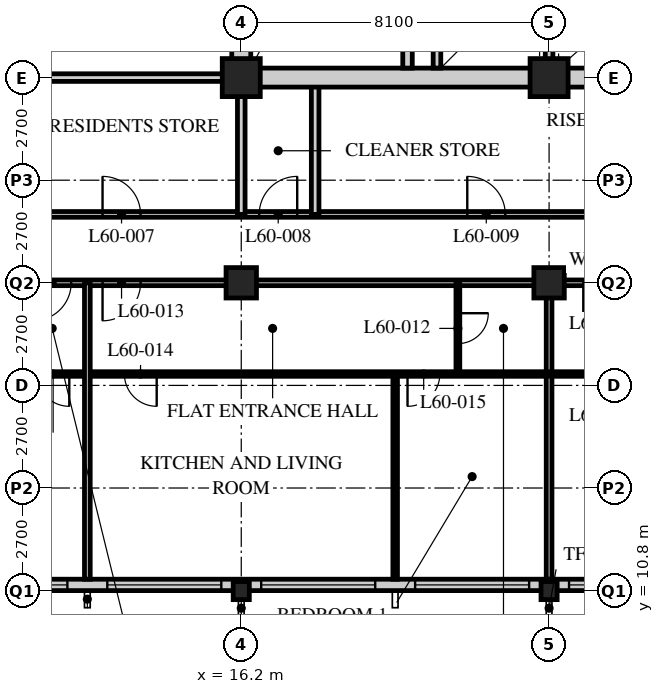
"""IFC4 building model, lengths in metres.
Left out: names, types, materials, properties, quantities, classifications, styles, units other than length and angle.
Written with IfcOpenShell. Run it as: python <this file> out.ifc"""

import sys

from ifc_helpers import new_model, si_unit, direction, frame, frame_2d, origin, origin_2d, place, context, subcontext, project, spatial, rectangle, hollow_rectangle, i_section, extrude, element, fill, save


model = new_model("IFC4")
c1 = context("Model", 3, precision=1e-05, world=origin(), true_north=direction((0.0, 1.0)))
c2 = subcontext(c1, "Body", "Model", "MODEL_VIEW")
j1 = project(units=[si_unit("LENGTHUNIT", "METRE"), si_unit("PLANEANGLEUNIT", "RADIAN")], contexts=[c1])
p1 = place(None, origin())
s1 = spatial("IfcSite", under=j1, at=p1, CompositionType="ELEMENT")
p2 = place(p1, origin())
s2 = spatial("IfcBuilding", under=s1, at=p2, CompositionType="ELEMENT")
p3 = place(p2, frame((0.0, 0.0, 231.6)))
s3 = spatial("IfcBuildingStorey", under=s2, at=p3, CompositionType="ELEMENT", Elevation=231.6)
p4 = place(p3, frame((16.2, 10.8, 0.0), z_axis=(0.0, 0.0, 1.0), x_axis=(1.0, 0.0, 0.0)))
e1 = element("IfcColumn", 1, at=p4, inside=s3, PredefinedType="COLUMN", context=c2, shape_type="SweptSolid", body=[
    extrude(i_section(OverallWidth=0.424, OverallDepth=0.475, WebThickness=0.048, FlangeThickness=0.077, FilletRadius=0.015, at=origin_2d()), origin(), (0.0, 0.0, 1.0), 3.6),
])
p5 = place(p3, frame((16.2, 18.9, 0.0), z_axis=(0.0, 0.0, 1.0), x_axis=(1.0, 0.0, 0.0)))
e2 = element("IfcColumn", 2, at=p5, inside=s3, PredefinedType="COLUMN", context=c2, shape_type="SweptSolid", body=[
    extrude(hollow_rectangle(XDim=0.8, YDim=0.8, WallThickness=0.08, at=origin_2d()), origin(), (0.0, 0.0, 1.0), 3.6),
])
p6 = place(p3, frame((16.2, 24.3, 0.0), z_axis=(0.0, 0.0, 1.0), x_axis=(1.0, 0.0, 0.0)))
e3 = element("IfcColumn", 3, at=p6, inside=s3, PredefinedType="COLUMN", context=c2, shape_type="SweptSolid", body=[
    extrude(hollow_rectangle(XDim=1.0, YDim=1.0, WallThickness=0.1, at=origin_2d()), origin(), (0.0, 0.0, 1.0), 3.6),
])
p7 = place(p3, frame((24.3, 10.8, 0.0), z_axis=(0.0, 0.0, 1.0), x_axis=(1.0, 0.0, 0.0)))
e4 = element("IfcColumn", 4, at=p7, inside=s3, PredefinedType="COLUMN", context=c2, shape_type="SweptSolid", body=[
    extrude(i_section(OverallWidth=0.424, OverallDepth=0.475, WebThickness=0.048, FlangeThickness=0.077, FilletRadius=0.015, at=origin_2d()), origin(), (0.0, 0.0, 1.0), 3.6),
])
p8 = place(p3, frame((24.3, 18.9, 0.0), z_axis=(0.0, 0.0, 1.0), x_axis=(1.0, 0.0, 0.0)))
e5 = element("IfcColumn", 5, at=p8, inside=s3, PredefinedType="COLUMN", context=c2, shape_type="SweptSolid", body=[
    extrude(hollow_rectangle(XDim=0.8, YDim=0.8, WallThickness=0.08, at=origin_2d()), origin(), (0.0, 0.0, 1.0), 3.6),
])
p9 = place(p3, frame((24.3, 24.3, 0.0), z_axis=(0.0, 0.0, 1.0), x_axis=(1.0, 0.0, 0.0)))
e6 = element("IfcColumn", 6, at=p9, inside=s3, PredefinedType="COLUMN", context=c2, shape_type="SweptSolid", body=[
    extrude(hollow_rectangle(XDim=1.0, YDim=1.0, WallThickness=0.1, at=origin_2d()), origin(), (0.0, 0.0, 1.0), 3.6),
])
p10 = place(p3, frame((8.4, 10.95, 0.0), z_axis=(0.0, 0.0, 1.0), x_axis=(1.0, 0.0, 0.0)))
e7 = element("IfcWall", 7, at=p10, inside=s3, PredefinedType="SOLIDWALL", context=c2, shape_type="SweptSolid", body=[
    extrude(rectangle(XDim=40.2, YDim=0.3, at=frame_2d((20.1, 0.0))), origin(), (0.0, 0.0, 1.0), 2.35),
])
p11 = place(p10, frame((0.225, 0.0, 0.6)))
e8 = element("IfcOpeningElement", 8, at=p11, cuts=e7, PredefinedType="OPENING", context=c2, shape_type="SweptSolid", body=[
    extrude(rectangle(XDim=3.0, YDim=1.7, at=frame_2d((1.5, 0.85))), frame((0.0, 0.16, 0.0), z_axis=(0.0, -1.0, 0.0), x_axis=(1.0, 0.0, 0.0)), (0.0, 0.0, 1.0), 0.32),
])
p12 = place(p10, frame((4.275, 0.0, 0.6)))
e9 = element("IfcOpeningElement", 9, at=p12, cuts=e7, PredefinedType="OPENING", context=c2, shape_type="SweptSolid", body=[
    extrude(rectangle(XDim=3.0, YDim=1.7, at=frame_2d((1.5, 0.85))), frame((0.0, 0.16, 0.0), z_axis=(0.0, -1.0, 0.0), x_axis=(1.0, 0.0, 0.0)), (0.0, 0.0, 1.0), 0.32),
])
p13 = place(p10, frame((8.325, 0.0, 0.6)))
e10 = element("IfcOpeningElement", 10, at=p13, cuts=e7, PredefinedType="OPENING", context=c2, shape_type="SweptSolid", body=[
    extrude(rectangle(XDim=3.0, YDim=1.7, at=frame_2d((1.5, 0.85))), frame((0.0, 0.16, 0.0), z_axis=(0.0, -1.0, 0.0), x_axis=(1.0, 0.0, 0.0)), (0.0, 0.0, 1.0), 0.32),
])
p14 = place(p10, frame((12.375, 0.0, 0.6)))
e11 = element("IfcOpeningElement", 11, at=p14, cuts=e7, PredefinedType="OPENING", context=c2, shape_type="SweptSolid", body=[
    extrude(rectangle(XDim=3.0, YDim=1.7, at=frame_2d((1.5, 0.85))), frame((0.0, 0.16, 0.0), z_axis=(0.0, -1.0, 0.0), x_axis=(1.0, 0.0, 0.0)), (0.0, 0.0, 1.0), 0.32),
])
p15 = place(p10, frame((16.425, 0.0, 0.6)))
e12 = element("IfcOpeningElement", 12, at=p15, cuts=e7, PredefinedType="OPENING", context=c2, shape_type="SweptSolid", body=[
    extrude(rectangle(XDim=3.0, YDim=1.7, at=frame_2d((1.5, 0.85))), frame((0.0, 0.16, 0.0), z_axis=(0.0, -1.0, 0.0), x_axis=(1.0, 0.0, 0.0)), (0.0, 0.0, 1.0), 0.32),
])
p16 = place(p10, frame((20.475, 0.0, 0.6)))
e13 = element("IfcOpeningElement", 13, at=p16, cuts=e7, PredefinedType="OPENING", context=c2, shape_type="SweptSolid", body=[
    extrude(rectangle(XDim=3.0, YDim=1.7, at=frame_2d((1.5, 0.85))), frame((0.0, 0.16, 0.0), z_axis=(0.0, -1.0, 0.0), x_axis=(1.0, 0.0, 0.0)), (0.0, 0.0, 1.0), 0.32),
])
p17 = place(p10, frame((24.525, 0.0, 0.6)))
e14 = element("IfcOpeningElement", 14, at=p17, cuts=e7, PredefinedType="OPENING", context=c2, shape_type="SweptSolid", body=[
    extrude(rectangle(XDim=3.0, YDim=1.7, at=frame_2d((1.5, 0.85))), frame((0.0, 0.16, 0.0), z_axis=(0.0, -1.0, 0.0), x_axis=(1.0, 0.0, 0.0)), (0.0, 0.0, 1.0), 0.32),
])
p18 = place(p10, frame((28.575, 0.0, 0.6)))
e15 = element("IfcOpeningElement", 15, at=p18, cuts=e7, PredefinedType="OPENING", context=c2, shape_type="SweptSolid", body=[
    extrude(rectangle(XDim=3.0, YDim=1.7, at=frame_2d((1.5, 0.85))), frame((0.0, 0.16, 0.0), z_axis=(0.0, -1.0, 0.0), x_axis=(1.0, 0.0, 0.0)), (0.0, 0.0, 1.0), 0.32),
])
p19 = place(p10, frame((32.625, 0.0, 0.6)))
e16 = element("IfcOpeningElement", 16, at=p19, cuts=e7, PredefinedType="OPENING", context=c2, shape_type="SweptSolid", body=[
    extrude(rectangle(XDim=3.0, YDim=1.7, at=frame_2d((1.5, 0.85))), frame((0.0, 0.16, 0.0), z_axis=(0.0, -1.0, 0.0), x_axis=(1.0, 0.0, 0.0)), (0.0, 0.0, 1.0), 0.32),
])
p20 = place(p10, frame((36.675, 0.0, 0.6)))
e17 = element("IfcOpeningElement", 17, at=p20, cuts=e7, PredefinedType="OPENING", context=c2, shape_type="SweptSolid", body=[
    extrude(rectangle(XDim=3.0, YDim=1.7, at=frame_2d((1.5, 0.85))), frame((0.0, 0.16, 0.0), z_axis=(0.0, -1.0, 0.0), x_axis=(1.0, 0.0, 0.0)), (0.0, 0.0, 1.0), 0.32),
])
p21 = place(p3, frame((8.1, 18.9, 0.0), z_axis=(0.0, 0.0, 1.0), x_axis=(1.0, 0.0, 0.0)))
e18 = element("IfcWall", 18, at=p21, inside=s3, PredefinedType="PARTITIONING", context=c2, shape_type="SweptSolid", body=[
    extrude(rectangle(XDim=36.45, YDim=0.15, at=frame_2d((18.225, 0.0))), origin(), (0.0, 0.0, 1.0), 2.35),
])
p22 = place(p21, frame((4.45, 0.0, 0.0)))
e19 = element("IfcOpeningElement", 19, at=p22, cuts=e18, PredefinedType="OPENING", context=c2, shape_type="SweptSolid", body=[
    extrude(rectangle(XDim=1.0, YDim=2.1, at=frame_2d((0.5, 1.05))), frame((0.0, 0.085, 0.0), z_axis=(0.0, -1.0, 0.0), x_axis=(1.0, 0.0, 0.0)), (0.0, 0.0, 1.0), 0.17),
])
p23 = place(p21, frame((17.1, 0.0, 0.0)))
e20 = element("IfcOpeningElement", 20, at=p23, cuts=e18, PredefinedType="OPENING", context=c2, shape_type="SweptSolid", body=[
    extrude(rectangle(XDim=1.0, YDim=2.1, at=frame_2d((0.5, 1.05))), frame((0.0, 0.085, 0.0), z_axis=(0.0, -1.0, 0.0), x_axis=(1.0, 0.0, 0.0)), (0.0, 0.0, 1.0), 0.17),
])
p24 = place(p21, frame((29.05, 0.0, 0.0)))
e21 = element("IfcOpeningElement", 21, at=p24, cuts=e18, PredefinedType="OPENING", context=c2, shape_type="SweptSolid", body=[
    extrude(rectangle(XDim=1.0, YDim=2.1, at=frame_2d((0.5, 1.05))), frame((0.0, 0.085, 0.0), z_axis=(0.0, -1.0, 0.0), x_axis=(1.0, 0.0, 0.0)), (0.0, 0.0, 1.0), 0.17),
])
p25 = place(p21, frame((2.625, 0.0, 0.0)))
e22 = element("IfcOpeningElement", 22, at=p25, cuts=e18, PredefinedType="OPENING", context=c2, shape_type="SweptSolid", body=[
    extrude(rectangle(XDim=1.0, YDim=2.1, at=frame_2d((0.5, 1.05))), frame((0.0, 0.085, 0.0), z_axis=(0.0, -1.0, 0.0), x_axis=(1.0, 0.0, 0.0)), (0.0, 0.0, 1.0), 0.17),
])
p26 = place(p21, frame((33.925, 0.0, 0.0)))
e23 = element("IfcOpeningElement", 23, at=p26, cuts=e18, PredefinedType="OPENING", context=c2, shape_type="SweptSolid", body=[
    extrude(rectangle(XDim=1.0, YDim=2.1, at=frame_2d((0.5, 1.05))), frame((0.0, 0.085, 0.0), z_axis=(0.0, -1.0, 0.0), x_axis=(1.0, 0.0, 0.0)), (0.0, 0.0, 1.0), 0.17),
])
p27 = place(p3, frame((9.9, 20.7, 0.0), z_axis=(0.0, 0.0, 1.0), x_axis=(1.0, 0.0, 0.0)))
e24 = element("IfcWall", 24, at=p27, inside=s3, PredefinedType="PARTITIONING", context=c2, shape_type="SweptSolid", body=[
    extrude(rectangle(XDim=17.24, YDim=0.15, at=frame_2d((8.62, 0.0))), origin(), (0.0, 0.0, 1.0), 3.35),
])
p28 = place(p27, frame((2.65, 0.0, 0.0)))
e25 = element("IfcOpeningElement", 25, at=p28, cuts=e24, PredefinedType="OPENING", context=c2, shape_type="SweptSolid", body=[
    extrude(rectangle(XDim=1.0, YDim=2.1, at=frame_2d((0.5, 1.05))), frame((0.0, 0.085, 0.0), z_axis=(0.0, -1.0, 0.0), x_axis=(1.0, 0.0, 0.0)), (0.0, 0.0, 1.0), 0.17),
])
p29 = place(p27, frame((6.772, 0.0, 0.0)))
e26 = element("IfcOpeningElement", 26, at=p29, cuts=e24, PredefinedType="OPENING", context=c2, shape_type="SweptSolid", body=[
    extrude(rectangle(XDim=1.0, YDim=2.1, at=frame_2d((0.5, 1.05))), frame((0.0, 0.085, 0.0), z_axis=(0.0, -1.0, 0.0), x_axis=(1.0, 0.0, 0.0)), (0.0, 0.0, 1.0), 0.17),
])
p30 = place(p27, frame((12.247, 0.0, 0.0)))
e27 = element("IfcOpeningElement", 27, at=p30, cuts=e24, PredefinedType="OPENING", context=c2, shape_type="SweptSolid", body=[
    extrude(rectangle(XDim=1.0, YDim=2.1, at=frame_2d((0.5, 1.05))), frame((0.0, 0.085, 0.0), z_axis=(0.0, -1.0, 0.0), x_axis=(1.0, 0.0, 0.0)), (0.0, 0.0, 1.0), 0.17),
])
p31 = place(p3, frame((16.2, 20.7, 0.0), z_axis=(0.0, 0.0, 1.0), x_axis=(0.0, 1.0, 0.0)))
e28 = element("IfcWall", 28, at=p31, inside=s3, PredefinedType="SOLIDWALL", context=c2, shape_type="SweptSolid", body=[
    extrude(rectangle(XDim=3.6, YDim=0.2, at=frame_2d((1.8, 0.0))), origin(), (0.0, 0.0, 1.0), 2.35),
])
p32 = place(p3, frame((18.144, 20.7, 0.0), z_axis=(0.0, 0.0, 1.0), x_axis=(0.0, 1.0, 0.0)))
e29 = element("IfcWall", 29, at=p32, inside=s3, PredefinedType="SOLIDWALL", context=c2, shape_type="SweptSolid", body=[
    extrude(rectangle(XDim=3.6, YDim=0.2, at=frame_2d((1.8, 0.0))), origin(), (0.0, 0.0, 1.0), 3.35),
])
p33 = place(p3, frame((9.9, 24.3, 0.0), z_axis=(0.0, 0.0, 1.0), x_axis=(1.0, 0.0, 0.0)))
e30 = element("IfcWall", 30, at=p33, inside=s3, PredefinedType="SOLIDWALL", context=c2, shape_type="SweptSolid", body=[
    extrude(rectangle(XDim=6.3, YDim=0.2, at=frame_2d((3.15, 0.0))), origin(), (0.0, 0.0, 1.0), 3.35),
])
p34 = place(p3, frame((21.9, 18.9, 0.0), z_axis=(0.0, 0.0, 1.0), x_axis=(0.0, -1.0, 0.0)))
e31 = element("IfcWall", 31, at=p34, inside=s3, PredefinedType="PARTITIONING", context=c2, shape_type="SweptSolid", body=[
    extrude(rectangle(XDim=2.4, YDim=0.1, at=frame_2d((1.2, 0.0))), origin(), (0.0, 0.0, 1.0), 3.35),
])
p35 = place(p34, frame((0.8, 0.0, 0.0)))
e32 = element("IfcOpeningElement", 32, at=p35, cuts=e31, PredefinedType="OPENING", context=c2, shape_type="SweptSolid", body=[
    extrude(rectangle(XDim=0.8, YDim=2.1, at=frame_2d((0.4, 1.05))), frame((0.0, 0.06, 0.0), z_axis=(0.0, -1.0, 0.0), x_axis=(1.0, 0.0, 0.0)), (0.0, 0.0, 1.0), 0.12),
])
p36 = place(p3, frame((20.25, 16.5, 0.0), z_axis=(0.0, 0.0, 1.0), x_axis=(0.0, -1.0, 0.0)))
e33 = element("IfcWall", 33, at=p36, inside=s3, PredefinedType="PARTITIONING", context=c2, shape_type="SweptSolid", body=[
    extrude(rectangle(XDim=5.4, YDim=0.12, at=frame_2d((2.7, 0.0))), origin(), (0.0, 0.0, 1.0), 3.35),
])
p37 = place(p3, frame((24.3, 18.9, 0.0), z_axis=(0.0, 0.0, 1.0), x_axis=(0.0, -1.0, 0.0)))
e34 = element("IfcWall", 34, at=p37, inside=s3, PredefinedType="PARTITIONING", context=c2, shape_type="SweptSolid", body=[
    extrude(rectangle(XDim=7.8, YDim=0.15, at=frame_2d((3.9, 0.0))), origin(), (0.0, 0.0, 1.0), 2.35),
])
p38 = place(p3, frame((8.1, 16.5, 0.0), z_axis=(0.0, 0.0, 1.0), x_axis=(1.0, 0.0, 0.0)))
e35 = element("IfcWall", 35, at=p38, inside=s3, PredefinedType="PARTITIONING", context=c2, shape_type="SweptSolid", body=[
    extrude(rectangle(XDim=28.35, YDim=0.12, at=frame_2d((14.175, 0.0))), origin(), (0.0, 0.0, 1.0), 3.35),
])
p39 = place(p38, frame((5.025, 0.0, 0.0)))
e36 = element("IfcOpeningElement", 36, at=p39, cuts=e35, PredefinedType="OPENING", context=c2, shape_type="SweptSolid", body=[
    extrude(rectangle(XDim=0.85, YDim=2.1, at=frame_2d((0.425, 1.05))), frame((0.0, 0.07, 0.0), z_axis=(0.0, -1.0, 0.0), x_axis=(1.0, 0.0, 0.0)), (0.0, 0.0, 1.0), 0.14),
])
p40 = place(p38, frame((12.475, 0.0, 0.0)))
e37 = element("IfcOpeningElement", 37, at=p40, cuts=e35, PredefinedType="OPENING", context=c2, shape_type="SweptSolid", body=[
    extrude(rectangle(XDim=0.85, YDim=2.1, at=frame_2d((0.425, 1.05))), frame((0.0, 0.07, 0.0), z_axis=(0.0, -1.0, 0.0), x_axis=(1.0, 0.0, 0.0)), (0.0, 0.0, 1.0), 0.14),
])
p41 = place(p38, frame((17.175, 0.0, 0.0)))
e38 = element("IfcOpeningElement", 38, at=p41, cuts=e35, PredefinedType="OPENING", context=c2, shape_type="SweptSolid", body=[
    extrude(rectangle(XDim=0.85, YDim=2.1, at=frame_2d((0.425, 1.05))), frame((0.0, 0.07, 0.0), z_axis=(0.0, -1.0, 0.0), x_axis=(1.0, 0.0, 0.0)), (0.0, 0.0, 1.0), 0.14),
])
p42 = place(p38, frame((24.625, 0.0, 0.0)))
e39 = element("IfcOpeningElement", 39, at=p42, cuts=e35, PredefinedType="OPENING", context=c2, shape_type="SweptSolid", body=[
    extrude(rectangle(XDim=0.85, YDim=2.1, at=frame_2d((0.425, 1.05))), frame((0.0, 0.07, 0.0), z_axis=(0.0, -1.0, 0.0), x_axis=(1.0, 0.0, 0.0)), (0.0, 0.0, 1.0), 0.14),
])
p43 = place(p38, frame((2.725, 0.0, 0.0)))
e40 = element("IfcOpeningElement", 40, at=p43, cuts=e35, PredefinedType="OPENING", context=c2, shape_type="SweptSolid", body=[
    extrude(rectangle(XDim=0.85, YDim=2.1, at=frame_2d((0.425, 1.05))), frame((0.0, 0.07, 0.0), z_axis=(0.0, -1.0, 0.0), x_axis=(1.0, 0.0, 0.0)), (0.0, 0.0, 1.0), 0.14),
])
p44 = place(p3, frame((12.15, 18.9, 0.0), z_axis=(0.0, 0.0, 1.0), x_axis=(0.0, -1.0, 0.0)))
e41 = element("IfcWall", 41, at=p44, inside=s3, PredefinedType="PARTITIONING", context=c2, shape_type="SweptSolid", body=[
    extrude(rectangle(XDim=7.8, YDim=0.15, at=frame_2d((3.9, 0.0))), origin(), (0.0, 0.0, 1.0), 3.35),
])
p45 = place(p3, frame((15.95, 24.3, 0.0), z_axis=(0.0, 0.0, 1.0), x_axis=(1.0, 0.0, 0.0)))
e42 = element("IfcWall", 42, at=p45, inside=s3, PredefinedType="SOLIDWALL", context=c2, shape_type="SweptSolid", body=[
    extrude(rectangle(XDim=24.8, YDim=0.5, at=frame_2d((12.4, 0.0))), origin(), (0.0, 0.0, 1.0), 2.588),
])
p46 = place(p45, frame((11.5, 0.0, 0.0)))
e43 = element("IfcOpeningElement", 43, at=p46, cuts=e42, PredefinedType="OPENING", context=c2, shape_type="SweptSolid", body=[
    extrude(rectangle(XDim=1.8, YDim=2.4, at=frame_2d((0.9, 1.2))), frame((0.0, 0.26, 0.0), z_axis=(0.0, -1.0, 0.0), x_axis=(1.0, 0.0, 0.0)), (0.0, 0.0, 1.0), 0.52),
])
p47 = place(p3, frame((16.2, 24.55, 0.0), z_axis=(0.0, 0.0, 1.0), x_axis=(0.0, 1.0, 0.0)))
e44 = element("IfcWall", 44, at=p47, inside=s3, PredefinedType="SOLIDWALL", context=c2, shape_type="SweptSolid", body=[
    extrude(rectangle(XDim=15.7, YDim=0.5, at=frame_2d((7.85, 0.0))), origin(), (0.0, 0.0, 1.0), 2.35),
])
p48 = place(p3, frame((24.3, 24.55, 0.0), z_axis=(0.0, 0.0, 1.0), x_axis=(0.0, 1.0, 0.0)))
e45 = element("IfcWall", 45, at=p48, inside=s3, PredefinedType="SOLIDWALL", context=c2, shape_type="SweptSolid", body=[
    extrude(rectangle(XDim=7.75, YDim=0.2, at=frame_2d((3.875, 0.0))), origin(), (0.0, 0.0, 1.0), 2.588),
])
p49 = place(p48, frame((4.6, 0.0, 0.0)))
e46 = element("IfcOpeningElement", 46, at=p49, cuts=e45, PredefinedType="OPENING", context=c2, shape_type="SweptSolid", body=[
    extrude(rectangle(XDim=1.2, YDim=2.1, at=frame_2d((0.6, 1.05))), frame((0.0, 0.11, 0.0), z_axis=(0.0, -1.0, 0.0), x_axis=(1.0, 0.0, 0.0)), (0.0, 0.0, 1.0), 0.22),
])
p50 = place(p3, frame((20.575, 24.55, 0.0), z_axis=(0.0, 0.0, 1.0), x_axis=(0.0, 1.0, 0.0)))
e47 = element("IfcWall", 47, at=p50, inside=s3, PredefinedType="SOLIDWALL", context=c2, shape_type="SweptSolid", body=[
    extrude(rectangle(XDim=7.75, YDim=0.25, at=frame_2d((3.875, 0.0))), origin(), (0.0, 0.0, 1.0), 3.35),
])
p51 = place(p50, frame((6.2, 0.0, 0.0)))
e48 = element("IfcOpeningElement", 48, at=p51, cuts=e47, PredefinedType="OPENING", context=c2, shape_type="SweptSolid", body=[
    extrude(rectangle(XDim=1.2, YDim=2.1, at=frame_2d((0.6, 1.05))), frame((0.0, 0.135, 0.0), z_axis=(0.0, -1.0, 0.0), x_axis=(1.0, 0.0, 0.0)), (0.0, 0.0, 1.0), 0.27),
])
p52 = place(p3, frame((21.35, 24.55, 0.0), z_axis=(0.0, 0.0, 1.0), x_axis=(0.0, 1.0, 0.0)))
e49 = element("IfcWall", 49, at=p52, inside=s3, PredefinedType="SOLIDWALL", context=c2, shape_type="SweptSolid", body=[
    extrude(rectangle(XDim=2.6, YDim=0.2, at=frame_2d((1.3, 0.0))), origin(), (0.0, 0.0, 1.0), 3.35),
])
p53 = place(p11, origin())
e50 = element("IfcWindow", 50, at=p53, inside=s3, PartitioningType="SINGLE_PANEL", PredefinedType="WINDOW", context=c2, shape_type="SweptSolid", body=[
    extrude(rectangle(XDim=3.0, YDim=1.7, at=frame_2d((1.5, 0.85))), frame((0.0, 0.03, 0.0), z_axis=(0.0, -1.0, 0.0), x_axis=(1.0, 0.0, 0.0)), (0.0, 0.0, 1.0), 0.06),
])
fill(e8, e50)
p54 = place(p12, origin())
e51 = element("IfcWindow", 51, at=p54, inside=s3, PartitioningType="SINGLE_PANEL", PredefinedType="WINDOW", context=c2, shape_type="SweptSolid", body=[
    extrude(rectangle(XDim=3.0, YDim=1.7, at=frame_2d((1.5, 0.85))), frame((0.0, 0.03, 0.0), z_axis=(0.0, -1.0, 0.0), x_axis=(1.0, 0.0, 0.0)), (0.0, 0.0, 1.0), 0.06),
])
fill(e9, e51)
p55 = place(p13, origin())
e52 = element("IfcWindow", 52, at=p55, inside=s3, PartitioningType="SINGLE_PANEL", PredefinedType="WINDOW", context=c2, shape_type="SweptSolid", body=[
    extrude(rectangle(XDim=3.0, YDim=1.7, at=frame_2d((1.5, 0.85))), frame((0.0, 0.03, 0.0), z_axis=(0.0, -1.0, 0.0), x_axis=(1.0, 0.0, 0.0)), (0.0, 0.0, 1.0), 0.06),
])
fill(e10, e52)
p56 = place(p14, origin())
e53 = element("IfcWindow", 53, at=p56, inside=s3, PartitioningType="SINGLE_PANEL", PredefinedType="WINDOW", context=c2, shape_type="SweptSolid", body=[
    extrude(rectangle(XDim=3.0, YDim=1.7, at=frame_2d((1.5, 0.85))), frame((0.0, 0.03, 0.0), z_axis=(0.0, -1.0, 0.0), x_axis=(1.0, 0.0, 0.0)), (0.0, 0.0, 1.0), 0.06),
])
fill(e11, e53)
p57 = place(p15, origin())
e54 = element("IfcWindow", 54, at=p57, inside=s3, PartitioningType="SINGLE_PANEL", PredefinedType="WINDOW", context=c2, shape_type="SweptSolid", body=[
    extrude(rectangle(XDim=3.0, YDim=1.7, at=frame_2d((1.5, 0.85))), frame((0.0, 0.03, 0.0), z_axis=(0.0, -1.0, 0.0), x_axis=(1.0, 0.0, 0.0)), (0.0, 0.0, 1.0), 0.06),
])
fill(e12, e54)
p58 = place(p28, origin())
e55 = element("IfcDoor", 55, at=p58, inside=s3, OperationType="SINGLE_SWING_LEFT", PredefinedType="DOOR", context=c2, shape_type="SweptSolid", body=[
    extrude(rectangle(XDim=1.0, YDim=2.1, at=frame_2d((0.5, 1.05))), frame((0.0, 0.025, 0.0), z_axis=(0.0, -1.0, 0.0), x_axis=(1.0, 0.0, 0.0)), (0.0, 0.0, 1.0), 0.05),
])
fill(e25, e55)
p59 = place(p29, origin())
e56 = element("IfcDoor", 56, at=p59, inside=s3, OperationType="SINGLE_SWING_RIGHT", PredefinedType="DOOR", context=c2, shape_type="SweptSolid", body=[
    extrude(rectangle(XDim=1.0, YDim=2.1, at=frame_2d((0.5, 1.05))), frame((0.0, 0.025, 0.0), z_axis=(0.0, -1.0, 0.0), x_axis=(1.0, 0.0, 0.0)), (0.0, 0.0, 1.0), 0.05),
])
fill(e26, e56)
p60 = place(p30, origin())
e57 = element("IfcDoor", 57, at=p60, inside=s3, OperationType="SINGLE_SWING_LEFT", PredefinedType="DOOR", context=c2, shape_type="SweptSolid", body=[
    extrude(rectangle(XDim=1.0, YDim=2.1, at=frame_2d((0.5, 1.05))), frame((0.0, 0.025, 0.0), z_axis=(0.0, -1.0, 0.0), x_axis=(1.0, 0.0, 0.0)), (0.0, 0.0, 1.0), 0.05),
])
fill(e27, e57)
p61 = place(p35, origin())
e58 = element("IfcDoor", 58, at=p61, inside=s3, OperationType="SINGLE_SWING_LEFT", PredefinedType="DOOR", context=c2, shape_type="SweptSolid", body=[
    extrude(rectangle(XDim=0.8, YDim=2.1, at=frame_2d((0.4, 1.05))), frame((0.0, 0.025, 0.0), z_axis=(0.0, -1.0, 0.0), x_axis=(1.0, 0.0, 0.0)), (0.0, 0.0, 1.0), 0.05),
])
fill(e32, e58)
p62 = place(p22, origin())
e59 = element("IfcDoor", 59, at=p62, inside=s3, OperationType="SINGLE_SWING_RIGHT", PredefinedType="DOOR", context=c2, shape_type="SweptSolid", body=[
    extrude(rectangle(XDim=1.0, YDim=2.1, at=frame_2d((0.5, 1.05))), frame((0.0, 0.025, 0.0), z_axis=(0.0, -1.0, 0.0), x_axis=(1.0, 0.0, 0.0)), (0.0, 0.0, 1.0), 0.05),
])
fill(e19, e59)
p63 = place(p39, origin())
e60 = element("IfcDoor", 60, at=p63, inside=s3, OperationType="SINGLE_SWING_LEFT", PredefinedType="DOOR", context=c2, shape_type="SweptSolid", body=[
    extrude(rectangle(XDim=0.85, YDim=2.1, at=frame_2d((0.425, 1.05))), frame((0.0, 0.025, 0.0), z_axis=(0.0, -1.0, 0.0), x_axis=(1.0, 0.0, 0.0)), (0.0, 0.0, 1.0), 0.05),
])
fill(e36, e60)
p64 = place(p40, origin())
e61 = element("IfcDoor", 61, at=p64, inside=s3, OperationType="SINGLE_SWING_RIGHT", PredefinedType="DOOR", context=c2, shape_type="SweptSolid", body=[
    extrude(rectangle(XDim=0.85, YDim=2.1, at=frame_2d((0.425, 1.05))), frame((0.0, 0.025, 0.0), z_axis=(0.0, -1.0, 0.0), x_axis=(1.0, 0.0, 0.0)), (0.0, 0.0, 1.0), 0.05),
])
fill(e37, e61)
p65 = place(p23, origin())
e62 = element("IfcDoor", 62, at=p65, inside=s3, OperationType="SINGLE_SWING_RIGHT", PredefinedType="DOOR", context=c2, shape_type="SweptSolid", body=[
    extrude(rectangle(XDim=1.0, YDim=2.1, at=frame_2d((0.5, 1.05))), frame((0.0, 0.025, 0.0), z_axis=(0.0, -1.0, 0.0), x_axis=(1.0, 0.0, 0.0)), (0.0, 0.0, 1.0), 0.05),
])
fill(e20, e62)
p66 = place(p25, origin())
e63 = element("IfcDoor", 63, at=p66, inside=s3, OperationType="SINGLE_SWING_RIGHT", PredefinedType="DOOR", context=c2, shape_type="SweptSolid", body=[
    extrude(rectangle(XDim=1.0, YDim=2.1, at=frame_2d((0.5, 1.05))), frame((0.0, 0.025, 0.0), z_axis=(0.0, -1.0, 0.0), x_axis=(1.0, 0.0, 0.0)), (0.0, 0.0, 1.0), 0.05),
])
fill(e22, e63)
p67 = place(p43, origin())
e64 = element("IfcDoor", 64, at=p67, inside=s3, OperationType="SINGLE_SWING_LEFT", PredefinedType="DOOR", context=c2, shape_type="SweptSolid", body=[
    extrude(rectangle(XDim=0.85, YDim=2.1, at=frame_2d((0.425, 1.05))), frame((0.0, 0.025, 0.0), z_axis=(0.0, -1.0, 0.0), x_axis=(1.0, 0.0, 0.0)), (0.0, 0.0, 1.0), 0.05),
])
fill(e40, e64)
save(model, sys.argv[1])
